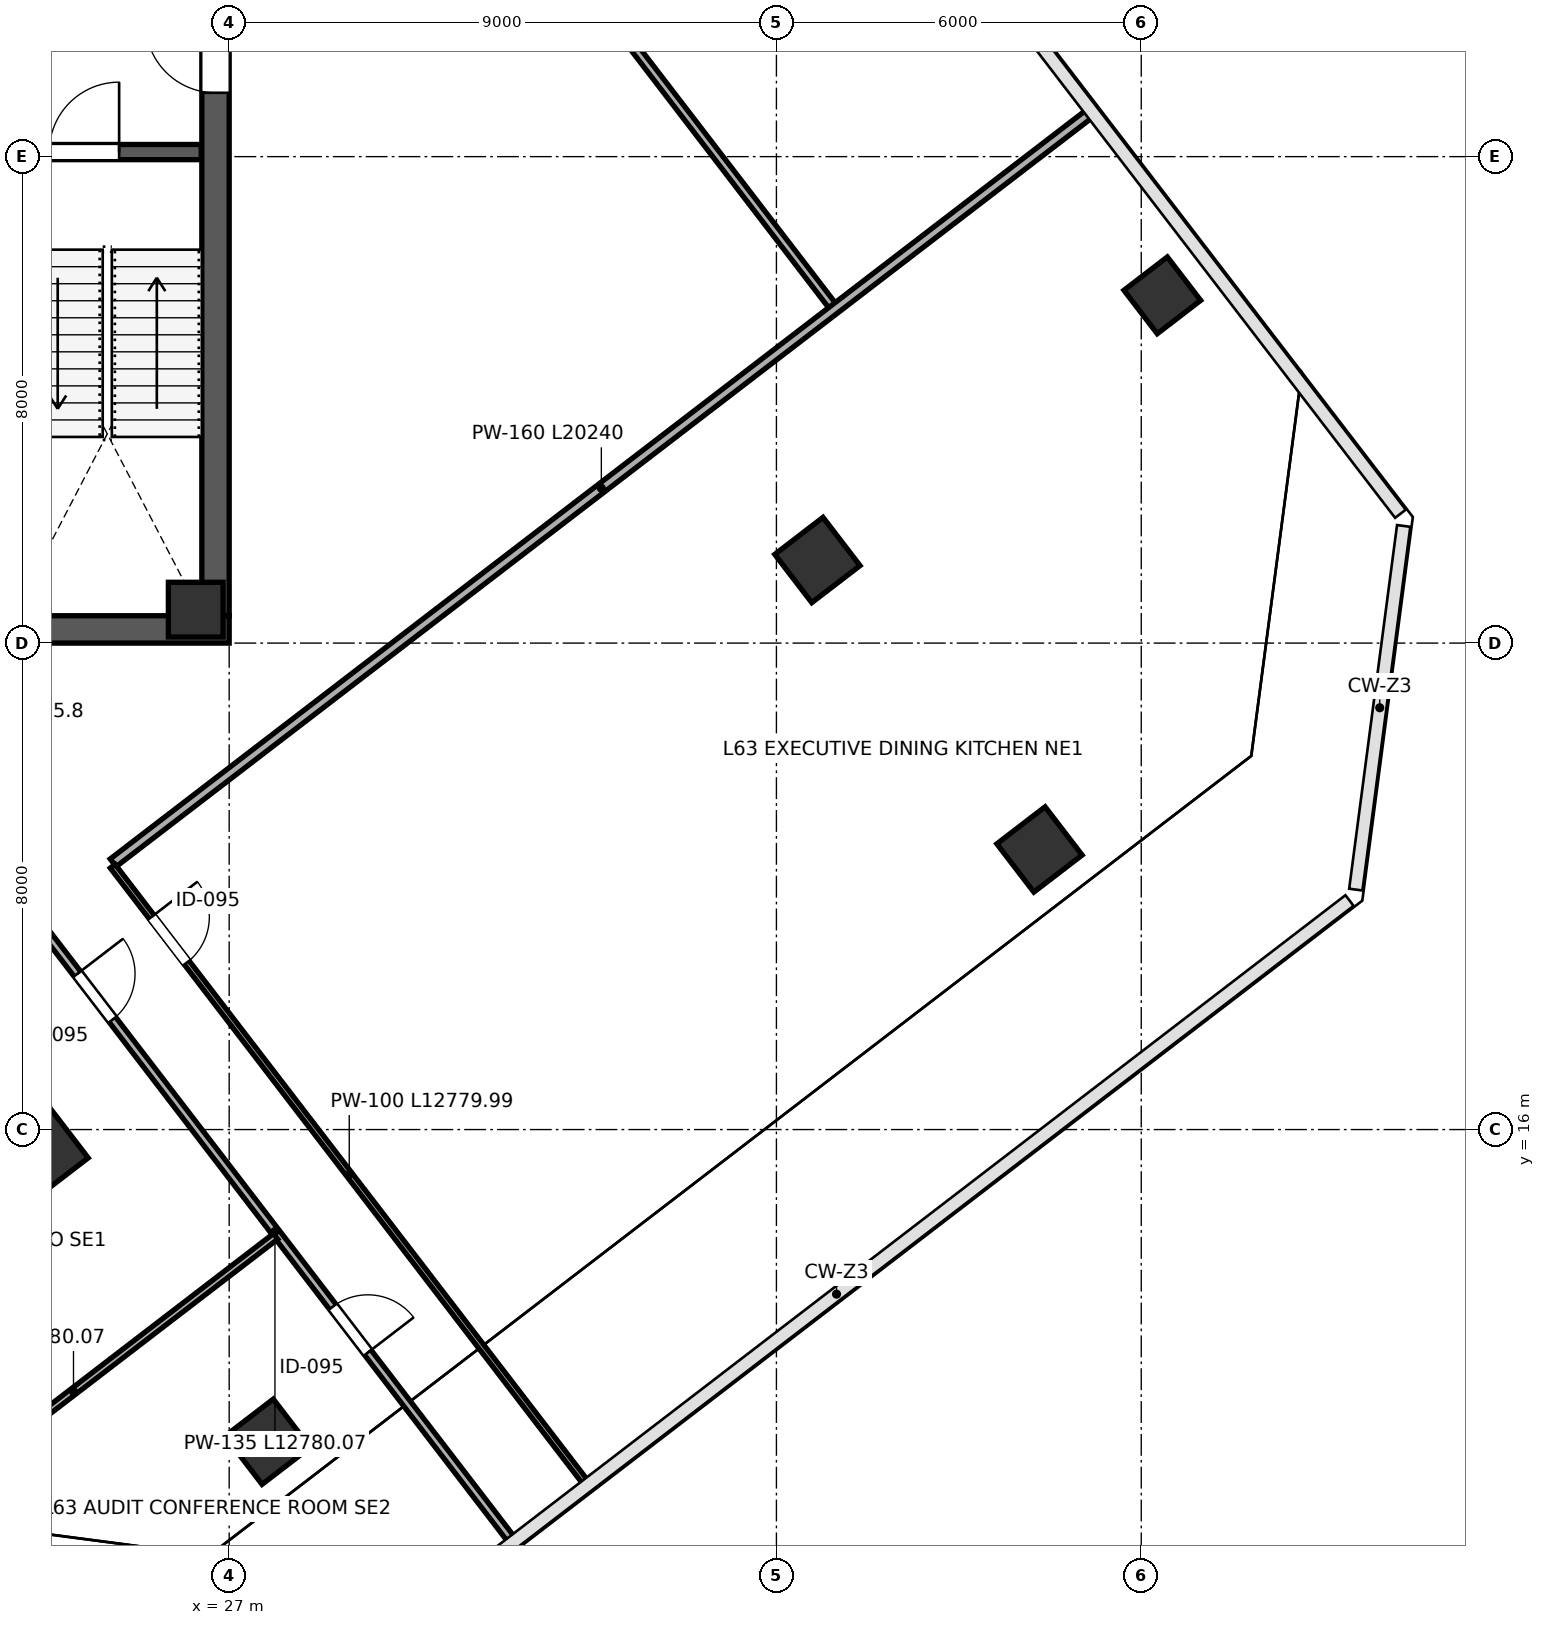
"""IFC4 building model, lengths in metres.
Left out: names, types, materials, properties, quantities, classifications, styles, units other than length and angle.
Written with IfcOpenShell. Run it as: python <this file> out.ifc"""

import sys

from ifc_helpers import new_model, si_unit, direction, frame, frame_2d, origin, origin_2d, place, context, subcontext, project, spatial, rectangle, extrude, source, transform, mapped, element, fill, save


model = new_model("IFC4")
c1 = context("Model", 3, precision=1e-05, world=origin(), true_north=direction((0.0, 1.0)))
c2 = subcontext(c1, "Body", "Model", "MODEL_VIEW")
j1 = project(units=[si_unit("LENGTHUNIT", "METRE"), si_unit("PLANEANGLEUNIT", "RADIAN")], contexts=[c1])
p1 = place(None, origin())
s1 = spatial("IfcSite", under=j1, at=p1, CompositionType="ELEMENT")
p2 = place(p1, origin())
s2 = spatial("IfcBuilding", under=s1, at=p2, CompositionType="ELEMENT")
p3 = place(p2, frame((0.0, 0.0, 279.4)))
s3 = spatial("IfcBuildingStorey", under=s2, at=p3, CompositionType="ELEMENT", Elevation=279.4)
m1 = source(origin(), c2, "Body", "SweptSolid", [
    extrude(rectangle(XDim=0.9, YDim=0.9, at=origin_2d()), origin(), (0.0, 0.0, 1.0), 4.199),
])
p4 = place(p3, frame((26.45, 24.55, 0.001), z_axis=(0.0, 0.0, 1.0), x_axis=(1.0, 0.0, 0.0)))
e1 = element("IfcColumn", 1, at=p4, inside=s3, PredefinedType="COLUMN", context=c2, shape_type="MappedRepresentation", body=[
    mapped(m1, transform((0.0, 0.0, 0.0), scale=1.0)),
])
m2 = source(origin(), c2, "Body", "SweptSolid", [
    extrude(rectangle(XDim=1.0, YDim=1.0, at=origin_2d()), origin(), (0.0, 0.0, 1.0), 4.199),
])
for number, where, z_axis, x_axis in (
    (2, (23.98, 15.626, 0.001), (0.0, 0.0, 1.0), (-0.609, 0.793, 0.0)),
    (3, (36.674, 25.366, 0.001), (0.0, 0.0, 1.0), (-0.609, 0.793, 0.0)),
):
    element("IfcColumn", number, at=place(p3, frame(where, z_axis=z_axis, x_axis=x_axis)), inside=s3, PredefinedType="COLUMN", context=c2, shape_type="MappedRepresentation", body=[
        mapped(m2, transform((0.0, 0.0, 0.0), scale=1.0)),
    ])
m3 = source(origin(), c2, "Body", "SweptSolid", [
    extrude(rectangle(XDim=0.9, YDim=0.9, at=origin_2d()), origin(), (0.0, 0.0, 1.0), 4.199),
])
p5 = place(p3, frame((42.346, 29.719, 0.001), z_axis=(0.0, 0.0, 1.0), x_axis=(-0.608761429009, 0.793353340291, 0.0)))
e4 = element("IfcColumn", 4, at=p5, inside=s3, PredefinedType="COLUMN", context=c2, shape_type="MappedRepresentation", body=[
    mapped(m3, transform((0.0, 0.0, 0.0), scale=1.0)),
])
m4 = source(origin(), c2, "Body", "SweptSolid", [
    extrude(rectangle(XDim=1.0, YDim=1.0, at=origin_2d()), origin(), (0.0, 0.0, 1.0), 4.199),
])
for number, where, z_axis, x_axis in (
    (5, (27.633, 10.866, 0.001), (0.0, 0.0, 1.0), (-0.609, 0.793, 0.0)),
    (6, (40.326, 20.606, 0.001), (0.0, 0.0, 1.0), (-0.609, 0.793, 0.0)),
):
    element("IfcColumn", number, at=place(p3, frame(where, z_axis=z_axis, x_axis=x_axis)), inside=s3, PredefinedType="COLUMN", context=c2, shape_type="MappedRepresentation", body=[
        mapped(m4, transform((0.0, 0.0, 0.0), scale=1.0)),
    ])
p6 = place(p3, frame((26.775, 24.45, 0.0), z_axis=(0.0, 0.0, 1.0), x_axis=(0.0, 1.0, 0.0)))
e7 = element("IfcWall", 7, at=p6, inside=s3, PredefinedType="SHEAR", context=c2, shape_type="SweptSolid", body=[
    extrude(rectangle(XDim=15.1, YDim=0.45, at=frame_2d((7.55, 0.0))), origin(), (0.0, 0.0, 1.0), 3.96),
])
p7 = place(p6, frame((8.6, 0.0, 0.0)))
e8 = element("IfcOpeningElement", 8, at=p7, cuts=e7, PredefinedType="OPENING", context=c2, shape_type="SweptSolid", body=[
    extrude(rectangle(XDim=1.15, YDim=2.2, at=frame_2d((0.575, 1.1))), frame((0.0, 0.235, 0.0), z_axis=(0.0, -1.0, 0.0), x_axis=(1.0, 0.0, 0.0)), (0.0, 0.0, 1.0), 0.47),
])
p8 = place(p3, frame((9.0, 24.225, 0.0), z_axis=(0.0, 0.0, 1.0), x_axis=(1.0, 0.0, 0.0)))
e9 = element("IfcWall", 9, at=p8, inside=s3, PredefinedType="SHEAR", context=c2, shape_type="SweptSolid", body=[
    extrude(rectangle(XDim=18.0, YDim=0.45, at=frame_2d((9.0, 0.0))), origin(), (0.0, 0.0, 1.0), 3.96),
])
p9 = place(p3, frame((23.19, 32.075, 0.0), z_axis=(0.0, 0.0, 1.0), x_axis=(1.0, 0.0, 0.0)))
e10 = element("IfcWall", 10, at=p9, inside=s3, PredefinedType="SHEAR", context=c2, shape_type="SweptSolid", body=[
    extrude(rectangle(XDim=3.35, YDim=0.25, at=frame_2d((1.675, 0.0))), origin(), (0.0, 0.0, 1.0), 3.96),
])
p10 = place(p9, frame((0.85, 0.0, 0.0)))
e11 = element("IfcOpeningElement", 11, at=p10, cuts=e10, PredefinedType="OPENING", context=c2, shape_type="SweptSolid", body=[
    extrude(rectangle(XDim=1.15, YDim=2.2, at=frame_2d((0.575, 1.1))), frame((0.0, 0.135, 0.0), z_axis=(0.0, -1.0, 0.0), x_axis=(1.0, 0.0, 0.0)), (0.0, 0.0, 1.0), 0.27),
])
p11 = place(p3, frame((20.518, 50.922, 0.0), z_axis=(0.0, 0.0, 1.0), x_axis=(0.608759693778, -0.793354671778, 0.0)))
e12 = element("IfcWall", 12, at=p11, inside=s3, PredefinedType="PARTITIONING", context=c2, shape_type="SweptSolid", body=[
    extrude(rectangle(XDim=26.97, YDim=0.135, at=frame_2d((13.485, 0.0))), origin(), (0.0, 0.0, 1.0), 3.96),
])
p12 = place(p11, frame((5.4, 0.0, 0.0)))
e13 = element("IfcOpeningElement", 13, at=p12, cuts=e12, PredefinedType="OPENING", context=c2, shape_type="SweptSolid", body=[
    extrude(rectangle(XDim=0.95, YDim=2.15, at=frame_2d((0.475, 1.075))), frame((0.0, 0.078, 0.0), z_axis=(0.0, -1.0, 0.0), x_axis=(1.0, 0.0, 0.0)), (0.0, 0.0, 1.0), 0.155),
])
p13 = place(p3, frame((25.092, 20.387, 0.0), z_axis=(0.0, 0.0, 1.0), x_axis=(0.793357014217, 0.608756641025, 0.0)))
e14 = element("IfcWall", 14, at=p13, inside=s3, PredefinedType="PARTITIONING", context=c2, shape_type="SweptSolid", body=[
    extrude(rectangle(XDim=20.24, YDim=0.16, at=frame_2d((10.12, 0.0))), origin(), (0.0, 0.0, 1.0), 3.195),
])
p14 = place(p3, frame((25.085, 20.331, 0.0), z_axis=(0.0, 0.0, 1.0), x_axis=(0.608748325205, -0.793363395022, 0.0)))
e15 = element("IfcWall", 15, at=p14, inside=s3, PredefinedType="PARTITIONING", context=c2, shape_type="SweptSolid", body=[
    extrude(rectangle(XDim=12.78, YDim=0.1, at=frame_2d((6.39, 0.0))), origin(), (0.0, 0.0, 1.0), 3.253),
])
p15 = place(p14, frame((1.05, 0.0, 0.0)))
e16 = element("IfcOpeningElement", 16, at=p15, cuts=e15, PredefinedType="OPENING", context=c2, shape_type="SweptSolid", body=[
    extrude(rectangle(XDim=0.95, YDim=2.15, at=frame_2d((0.475, 1.075))), frame((0.0, 0.06, 0.0), z_axis=(0.0, -1.0, 0.0), x_axis=(1.0, 0.0, 0.0)), (0.0, 0.0, 1.0), 0.12),
])
p16 = place(p3, frame((23.863, 19.393, 0.0), z_axis=(0.0, 0.0, 1.0), x_axis=(0.608748325205, -0.793363395022, 0.0)))
e17 = element("IfcWall", 17, at=p16, inside=s3, PredefinedType="PARTITIONING", context=c2, shape_type="SweptSolid", body=[
    extrude(rectangle(XDim=12.78, YDim=0.135, at=frame_2d((6.39, 0.0))), origin(), (0.0, 0.0, 1.0), 3.253),
])
p17 = place(p16, frame((1.05, 0.0, 0.0)))
e18 = element("IfcOpeningElement", 18, at=p17, cuts=e17, PredefinedType="OPENING", context=c2, shape_type="SweptSolid", body=[
    extrude(rectangle(XDim=0.95, YDim=2.15, at=frame_2d((0.475, 1.075))), frame((0.0, 0.078, 0.0), z_axis=(0.0, -1.0, 0.0), x_axis=(1.0, 0.0, 0.0)), (0.0, 0.0, 1.0), 0.155),
])
p18 = place(p16, frame((7.95, 0.0, 0.0)))
e19 = element("IfcOpeningElement", 19, at=p18, cuts=e17, PredefinedType="OPENING", context=c2, shape_type="SweptSolid", body=[
    extrude(rectangle(XDim=0.95, YDim=2.15, at=frame_2d((0.475, 1.075))), frame((0.0, 0.078, 0.0), z_axis=(0.0, -1.0, 0.0), x_axis=(1.0, 0.0, 0.0)), (0.0, 0.0, 1.0), 0.155),
])
p19 = place(p3, frame((21.115, 9.142, 0.0), z_axis=(0.0, 0.0, 1.0), x_axis=(0.793351209169, 0.608764206331, 0.0)))
e20 = element("IfcWall", 20, at=p19, inside=s3, PredefinedType="PARTITIONING", context=c2, shape_type="SweptSolid", body=[
    extrude(rectangle(XDim=8.38, YDim=0.115, at=frame_2d((4.19, 0.0))), origin(), (0.0, 0.0, 1.0), 3.96),
])
m5 = source(origin(), c2, "Body", "SweptSolid", [
    extrude(rectangle(XDim=1.15, YDim=2.2, at=frame_2d((0.575, 1.1))), frame((0.0, 0.025, 0.0), z_axis=(0.0, -1.0, 0.0), x_axis=(1.0, 0.0, 0.0)), (0.0, 0.0, 1.0), 0.05),
])
p20 = place(p10, origin())
e21 = element("IfcDoor", 21, at=p20, inside=s3, OperationType="SINGLE_SWING_RIGHT", PredefinedType="DOOR", context=c2, shape_type="MappedRepresentation", body=[
    mapped(m5, transform((0.0, 0.0, 0.0), scale=1.0)),
])
fill(e11, e21)
m6 = source(origin(), c2, "Body", "SweptSolid", [
    extrude(rectangle(XDim=1.15, YDim=2.2, at=frame_2d((0.575, 1.1))), frame((0.0, 0.025, 0.0), z_axis=(0.0, -1.0, 0.0), x_axis=(1.0, 0.0, 0.0)), (0.0, 0.0, 1.0), 0.05),
])
p21 = place(p7, origin())
e22 = element("IfcDoor", 22, at=p21, inside=s3, OperationType="SINGLE_SWING_RIGHT", PredefinedType="DOOR", context=c2, shape_type="MappedRepresentation", body=[
    mapped(m6, transform((0.0, 0.0, 0.0), scale=1.0)),
])
fill(e8, e22)
m7 = source(origin(), c2, "Body", "SweptSolid", [
    extrude(rectangle(XDim=0.95, YDim=2.15, at=frame_2d((0.475, 1.075))), frame((0.0, 0.025, 0.0), z_axis=(0.0, -1.0, 0.0), x_axis=(1.0, 0.0, 0.0)), (0.0, 0.0, 1.0), 0.05),
])
p22 = place(p15, origin())
e23 = element("IfcDoor", 23, at=p22, inside=s3, OperationType="SINGLE_SWING_LEFT", PredefinedType="DOOR", context=c2, shape_type="MappedRepresentation", body=[
    mapped(m7, transform((0.0, 0.0, 0.0), scale=1.0)),
])
fill(e16, e23)
p23 = place(p17, origin())
e24 = element("IfcDoor", 24, at=p23, inside=s3, OperationType="SINGLE_SWING_LEFT", PredefinedType="DOOR", context=c2, shape_type="MappedRepresentation", body=[
    mapped(m7, transform((0.0, 0.0, 0.0), scale=1.0)),
])
fill(e18, e24)
p24 = place(p18, origin())
e25 = element("IfcDoor", 25, at=p24, inside=s3, OperationType="SINGLE_SWING_RIGHT", PredefinedType="DOOR", context=c2, shape_type="MappedRepresentation", body=[
    mapped(m7, transform((0.0, 0.0, 0.0), scale=1.0)),
])
fill(e19, e25)
save(model, sys.argv[1])
